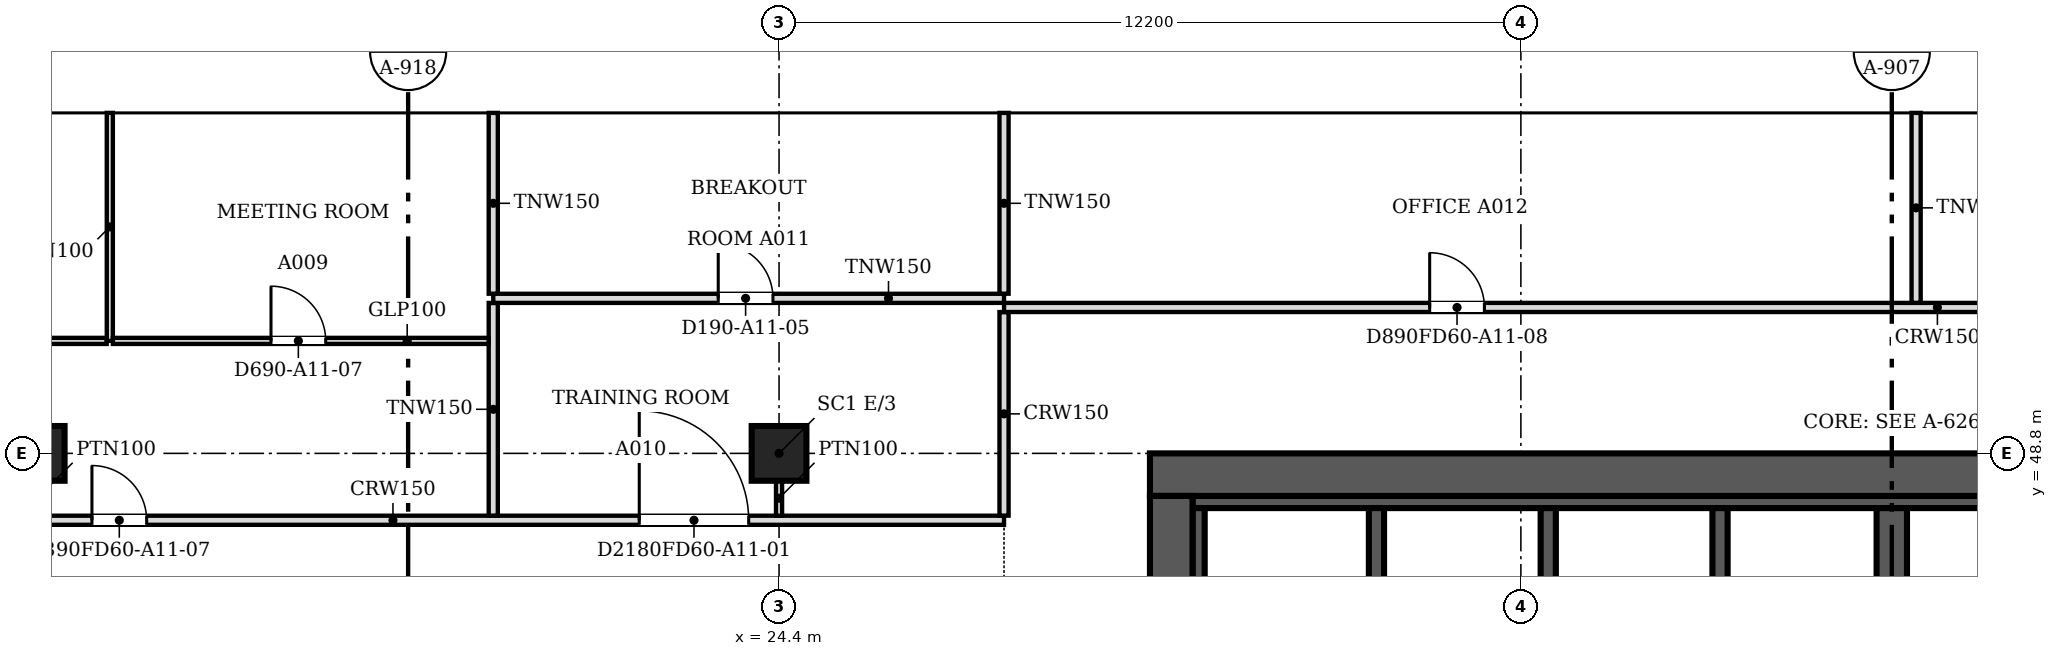
"""IFC4 building model, lengths in metres.
Left out: names, types, materials, properties, quantities, classifications, styles, units other than length and angle.
Written with IfcOpenShell. Run it as: python <this file> out.ifc"""

import sys

from ifc_helpers import new_model, si_unit, direction, frame, frame_2d, origin, origin_2d, place, context, subcontext, project, spatial, polyline, rectangle, outline, extrude, faceted_brep, source, transform, mapped, element, fill, save


model = new_model("IFC4")
c1 = context("Model", 3, precision=1e-05, world=origin(), true_north=direction((0.0, 1.0)))
c2 = subcontext(c1, "Body", "Model", "MODEL_VIEW")
j1 = project(units=[si_unit("LENGTHUNIT", "METRE"), si_unit("PLANEANGLEUNIT", "RADIAN")], contexts=[c1])
p1 = place(None, origin())
s1 = spatial("IfcSite", under=j1, at=p1, CompositionType="ELEMENT")
p2 = place(p1, origin())
s2 = spatial("IfcBuilding", under=s1, at=p2, CompositionType="ELEMENT")
p3 = place(p2, frame((0.0, 0.0, 124.0)))
s3 = spatial("IfcBuildingStorey", under=s2, at=p3, CompositionType="ELEMENT", Elevation=124.0)
for number, where, z_axis, x_axis in (
    (1, (12.2, 48.8, 0.0), (0.0, 0.0, 1.0), (1.0, 0.0, 0.0)),
    (2, (24.4, 48.8, 0.0), (0.0, 0.0, 1.0), (1.0, 0.0, 0.0)),
):
    element("IfcColumn", number, at=place(p3, frame(where, z_axis=z_axis, x_axis=x_axis)), inside=s3, PredefinedType="COLUMN", context=c2, shape_type="SweptSolid", body=[
        extrude(rectangle(XDim=0.9, YDim=0.9, at=origin_2d()), origin(), (0.0, 0.0, 1.0), 3.6),
    ])
m1 = source(origin(), c2, "Body", "SweptSolid", [
    extrude(outline(polyline([(3.05, 0.0), (6.1, 3.8), (3.05, 7.6), (0.0, 3.8), (3.05, 0.0)])), frame((0.0, 0.25, 0.0), z_axis=(0.0, -1.0, 0.0), x_axis=(1.0, 0.0, 0.0)), (0.0, 0.0, 1.0), 0.5),
])
p4 = place(p3, frame((48.8, 54.65, -3.8), z_axis=(0.0, 0.0, 1.0), x_axis=(-1.0, 0.0, 0.0)))
e3 = element("IfcWall", 3, at=p4, inside=s3, PredefinedType="SOLIDWALL", context=c2, shape_type="MappedRepresentation", body=[
    mapped(m1, transform((0.0, 0.0, 0.0), scale=1.0)),
])
m2 = source(origin(), c2, "Body", "SweptSolid", [
    extrude(outline(polyline([(3.05, 0.399), (5.78, 3.8), (3.05, 7.201), (0.321, 3.8), (3.05, 0.399)])), frame((0.0, 0.26, 0.0), z_axis=(0.0, -1.0, 0.0), x_axis=(1.0, 0.0, 0.0)), (0.0, 0.0, 1.0), 0.52),
])
p5 = place(p4, origin())
e4 = element("IfcOpeningElement", 4, at=p5, cuts=e3, PredefinedType="OPENING", context=c2, shape_type="MappedRepresentation", body=[
    mapped(m2, transform((0.0, 0.0, 0.0), scale=1.0)),
])
m3 = source(origin(), c2, "Body", "Brep", [
    faceted_brep([(3.05, -0.25, 0.0), (6.1, -0.25, 3.8), (6.1, -0.25, 3.8), (3.05, -0.25, 7.6), (0.0, -0.25, 3.8), (0.0, 0.25, 3.8), (3.05, 0.25, 7.6), (6.1, 0.25, 3.8), (6.1, 0.25, 3.8), (3.05, 0.25, 0.0)], [[[0, 1, 2, 3, 4]], [[5, 6, 7, 8, 9]], [[9, 8, 1, 0]], [[7, 6, 3, 2]], [[6, 5, 4, 3]], [[5, 9, 0, 4]], [[1, 8, 7, 2]]]),
])
p6 = place(p3, frame((42.7, 54.65, -3.8), z_axis=(0.0, 0.0, 1.0), x_axis=(-1.0, 0.0, 0.0)))
e5 = element("IfcWall", 5, at=p6, inside=s3, PredefinedType="SOLIDWALL", context=c2, shape_type="MappedRepresentation", body=[
    mapped(m3, transform((0.0, 0.0, 0.0), scale=1.0)),
])
p7 = place(p6, origin())
e6 = element("IfcOpeningElement", 6, at=p7, cuts=e5, PredefinedType="OPENING", context=c2, shape_type="MappedRepresentation", body=[
    mapped(m2, transform((0.0, 0.0, 0.0), scale=1.0)),
])
p8 = place(p3, frame((36.6, 54.65, -3.8), z_axis=(0.0, 0.0, 1.0), x_axis=(-1.0, 0.0, 0.0)))
e7 = element("IfcWall", 7, at=p8, inside=s3, PredefinedType="SOLIDWALL", context=c2, shape_type="MappedRepresentation", body=[
    mapped(m1, transform((0.0, 0.0, 0.0), scale=1.0)),
])
p9 = place(p8, origin())
e8 = element("IfcOpeningElement", 8, at=p9, cuts=e7, PredefinedType="OPENING", context=c2, shape_type="MappedRepresentation", body=[
    mapped(m2, transform((0.0, 0.0, 0.0), scale=1.0)),
])
p10 = place(p3, frame((30.5, 54.65, -3.8), z_axis=(0.0, 0.0, 1.0), x_axis=(-1.0, 0.0, 0.0)))
e9 = element("IfcWall", 9, at=p10, inside=s3, PredefinedType="SOLIDWALL", context=c2, shape_type="MappedRepresentation", body=[
    mapped(m1, transform((0.0, 0.0, 0.0), scale=1.0)),
])
p11 = place(p10, origin())
e10 = element("IfcOpeningElement", 10, at=p11, cuts=e9, PredefinedType="OPENING", context=c2, shape_type="MappedRepresentation", body=[
    mapped(m2, transform((0.0, 0.0, 0.0), scale=1.0)),
])
p12 = place(p3, frame((24.4, 54.65, -3.8), z_axis=(0.0, 0.0, 1.0), x_axis=(-1.0, 0.0, 0.0)))
e11 = element("IfcWall", 11, at=p12, inside=s3, PredefinedType="SOLIDWALL", context=c2, shape_type="MappedRepresentation", body=[
    mapped(m3, transform((0.0, 0.0, 0.0), scale=1.0)),
])
p13 = place(p12, origin())
e12 = element("IfcOpeningElement", 12, at=p13, cuts=e11, PredefinedType="OPENING", context=c2, shape_type="MappedRepresentation", body=[
    mapped(m2, transform((0.0, 0.0, 0.0), scale=1.0)),
])
p14 = place(p3, frame((18.3, 54.65, -3.8), z_axis=(0.0, 0.0, 1.0), x_axis=(-1.0, 0.0, 0.0)))
e13 = element("IfcWall", 13, at=p14, inside=s3, PredefinedType="SOLIDWALL", context=c2, shape_type="MappedRepresentation", body=[
    mapped(m1, transform((0.0, 0.0, 0.0), scale=1.0)),
])
p15 = place(p14, origin())
e14 = element("IfcOpeningElement", 14, at=p15, cuts=e13, PredefinedType="OPENING", context=c2, shape_type="MappedRepresentation", body=[
    mapped(m2, transform((0.0, 0.0, 0.0), scale=1.0)),
])
p16 = place(p2, frame((0.0, 0.0, 127.8)))
s4 = spatial("IfcBuildingStorey", under=s2, at=p16, CompositionType="ELEMENT", Elevation=127.8)
p17 = place(p16, frame((45.75, 54.65, -3.8), z_axis=(0.0, 0.0, 1.0), x_axis=(-1.0, 0.0, 0.0)))
e15 = element("IfcWall", 15, at=p17, inside=s4, PredefinedType="SOLIDWALL", context=c2, shape_type="MappedRepresentation", body=[
    mapped(m1, transform((0.0, 0.0, 0.0), scale=1.0)),
])
p18 = place(p17, origin())
e16 = element("IfcOpeningElement", 16, at=p18, cuts=e15, PredefinedType="OPENING", context=c2, shape_type="MappedRepresentation", body=[
    mapped(m2, transform((0.0, 0.0, 0.0), scale=1.0)),
])
p19 = place(p16, frame((39.65, 54.65, -3.8), z_axis=(0.0, 0.0, 1.0), x_axis=(-1.0, 0.0, 0.0)))
e17 = element("IfcWall", 17, at=p19, inside=s4, PredefinedType="SOLIDWALL", context=c2, shape_type="MappedRepresentation", body=[
    mapped(m3, transform((0.0, 0.0, 0.0), scale=1.0)),
])
p20 = place(p19, origin())
e18 = element("IfcOpeningElement", 18, at=p20, cuts=e17, PredefinedType="OPENING", context=c2, shape_type="MappedRepresentation", body=[
    mapped(m2, transform((0.0, 0.0, 0.0), scale=1.0)),
])
p21 = place(p16, frame((33.55, 54.65, -3.8), z_axis=(0.0, 0.0, 1.0), x_axis=(-1.0, 0.0, 0.0)))
e19 = element("IfcWall", 19, at=p21, inside=s4, PredefinedType="SOLIDWALL", context=c2, shape_type="MappedRepresentation", body=[
    mapped(m1, transform((0.0, 0.0, 0.0), scale=1.0)),
])
p22 = place(p21, origin())
e20 = element("IfcOpeningElement", 20, at=p22, cuts=e19, PredefinedType="OPENING", context=c2, shape_type="MappedRepresentation", body=[
    mapped(m2, transform((0.0, 0.0, 0.0), scale=1.0)),
])
p23 = place(p16, frame((27.45, 54.65, -3.8), z_axis=(0.0, 0.0, 1.0), x_axis=(-1.0, 0.0, 0.0)))
e21 = element("IfcWall", 21, at=p23, inside=s4, PredefinedType="SOLIDWALL", context=c2, shape_type="MappedRepresentation", body=[
    mapped(m3, transform((0.0, 0.0, 0.0), scale=1.0)),
])
p24 = place(p23, origin())
e22 = element("IfcOpeningElement", 22, at=p24, cuts=e21, PredefinedType="OPENING", context=c2, shape_type="MappedRepresentation", body=[
    mapped(m2, transform((0.0, 0.0, 0.0), scale=1.0)),
])
p25 = place(p16, frame((21.35, 54.65, -3.8), z_axis=(0.0, 0.0, 1.0), x_axis=(-1.0, 0.0, 0.0)))
e23 = element("IfcWall", 23, at=p25, inside=s4, PredefinedType="SOLIDWALL", context=c2, shape_type="MappedRepresentation", body=[
    mapped(m1, transform((0.0, 0.0, 0.0), scale=1.0)),
])
p26 = place(p25, origin())
e24 = element("IfcOpeningElement", 24, at=p26, cuts=e23, PredefinedType="OPENING", context=c2, shape_type="MappedRepresentation", body=[
    mapped(m2, transform((0.0, 0.0, 0.0), scale=1.0)),
])
p27 = place(p16, frame((15.25, 54.65, -3.8), z_axis=(0.0, 0.0, 1.0), x_axis=(-1.0, 0.0, 0.0)))
e25 = element("IfcWall", 25, at=p27, inside=s4, PredefinedType="SOLIDWALL", context=c2, shape_type="MappedRepresentation", body=[
    mapped(m1, transform((0.0, 0.0, 0.0), scale=1.0)),
])
p28 = place(p27, origin())
e26 = element("IfcOpeningElement", 26, at=p28, cuts=e25, PredefinedType="OPENING", context=c2, shape_type="MappedRepresentation", body=[
    mapped(m2, transform((0.0, 0.0, 0.0), scale=1.0)),
])
p29 = place(p3, frame((30.85, 25.1, 0.0), z_axis=(0.0, 0.0, 1.0), x_axis=(0.0, 1.0, 0.0)))
e27 = element("IfcWall", 27, at=p29, inside=s3, PredefinedType="SHEAR", context=c2, shape_type="SweptSolid", body=[
    extrude(rectangle(XDim=23.0, YDim=0.7, at=frame_2d((11.5, 0.0))), origin(), (0.0, 0.0, 1.0), 3.8),
])
m4 = source(origin(), c2, "Body", "SweptSolid", [
    extrude(rectangle(XDim=2.1, YDim=2.4, at=frame_2d((1.05, 1.2))), frame((0.0, 0.36, 0.0), z_axis=(0.0, -1.0, 0.0), x_axis=(1.0, 0.0, 0.0)), (0.0, 0.0, 1.0), 0.72),
])
p30 = place(p29, frame((4.7, 0.0, 0.0)))
e28 = element("IfcOpeningElement", 28, at=p30, cuts=e27, PredefinedType="OPENING", context=c2, shape_type="MappedRepresentation", body=[
    mapped(m4, transform((0.0, 0.0, 0.0), scale=1.0)),
])
p31 = place(p29, frame((16.2, 0.0, 0.0)))
e29 = element("IfcOpeningElement", 29, at=p31, cuts=e27, PredefinedType="OPENING", context=c2, shape_type="MappedRepresentation", body=[
    mapped(m4, transform((0.0, 0.0, 0.0), scale=1.0)),
])
p32 = place(p3, frame((30.5, 48.45, 0.0), z_axis=(0.0, 0.0, 1.0), x_axis=(1.0, 0.0, 0.0)))
e30 = element("IfcWall", 30, at=p32, inside=s3, PredefinedType="SHEAR", context=c2, shape_type="SweptSolid", body=[
    extrude(rectangle(XDim=24.4, YDim=0.7, at=frame_2d((12.2, 0.0))), origin(), (0.0, 0.0, 1.0), 3.8),
])
p33 = place(p3, frame((31.2, 48.0, 0.0), z_axis=(0.0, 0.0, 1.0), x_axis=(1.0, 0.0, 0.0)))
e31 = element("IfcWall", 31, at=p33, inside=s3, PredefinedType="SOLIDWALL", context=c2, shape_type="SweptSolid", body=[
    extrude(rectangle(XDim=23.0, YDim=0.2, at=frame_2d((11.5, 0.0))), origin(), (0.0, 0.0, 1.0), 3.8),
])
p34 = place(p3, frame((31.3, 43.4, 0.0), z_axis=(0.0, 0.0, 1.0), x_axis=(0.0, 1.0, 0.0)))
e32 = element("IfcWall", 32, at=p34, inside=s3, PredefinedType="SOLIDWALL", context=c2, shape_type="SweptSolid", body=[
    extrude(rectangle(XDim=4.5, YDim=0.2, at=frame_2d((2.25, 0.0))), origin(), (0.0, 0.0, 1.0), 3.8),
])
p35 = place(p3, frame((42.7, 44.9, 0.0), z_axis=(0.0, 0.0, 1.0), x_axis=(0.0, 1.0, 0.0)))
e33 = element("IfcWall", 33, at=p35, inside=s3, PredefinedType="SHEAR", context=c2, shape_type="SweptSolid", body=[
    extrude(rectangle(XDim=3.0, YDim=0.5, at=frame_2d((1.5, 0.0))), origin(), (0.0, 0.0, 1.0), 3.8),
])
for number, where, z_axis, x_axis in (
    (34, (34.225, 45.025, 0.0), (0.0, 0.0, 1.0), (0.0, 1.0, 0.0)),
    (35, (37.05, 45.025, 0.0), (0.0, 0.0, 1.0), (0.0, 1.0, 0.0)),
    (36, (39.875, 45.025, 0.0), (0.0, 0.0, 1.0), (0.0, 1.0, 0.0)),
):
    element("IfcWall", number, at=place(p3, frame(where, z_axis=z_axis, x_axis=x_axis)), inside=s3, PredefinedType="SOLIDWALL", context=c2, shape_type="SweptSolid", body=[
        extrude(rectangle(XDim=2.875, YDim=0.25, at=frame_2d((1.438, 0.0))), origin(), (0.0, 0.0, 1.0), 3.8),
    ])
p36 = place(p3, frame((7.5, 47.7, 0.0), z_axis=(0.0, 0.0, 1.0), x_axis=(1.0, 0.0, 0.0)))
e37 = element("IfcWall", 37, at=p36, inside=s3, PredefinedType="PARTITIONING", context=c2, shape_type="SweptSolid", body=[
    extrude(rectangle(XDim=20.6, YDim=0.15, at=frame_2d((10.3, 0.0))), origin(), (0.0, 0.0, 1.0), 3.067),
])
m5 = source(origin(), c2, "Body", "SweptSolid", [
    extrude(rectangle(XDim=1.8, YDim=2.1, at=frame_2d((0.9, 1.05))), frame((0.0, 0.085, 0.0), z_axis=(0.0, -1.0, 0.0), x_axis=(1.0, 0.0, 0.0)), (0.0, 0.0, 1.0), 0.17),
])
p37 = place(p36, frame((14.601, 0.0, 0.0)))
e38 = element("IfcOpeningElement", 38, at=p37, cuts=e37, PredefinedType="OPENING", context=c2, shape_type="MappedRepresentation", body=[
    mapped(m5, transform((0.0, 0.0, 0.0), scale=1.0)),
])
m6 = source(origin(), c2, "Body", "SweptSolid", [
    extrude(rectangle(XDim=0.9, YDim=2.1, at=frame_2d((0.45, 1.05))), frame((0.0, 0.085, 0.0), z_axis=(0.0, -1.0, 0.0), x_axis=(1.0, 0.0, 0.0)), (0.0, 0.0, 1.0), 0.17),
])
p38 = place(p36, frame((5.6, 0.0, 0.0)))
e39 = element("IfcOpeningElement", 39, at=p38, cuts=e37, PredefinedType="OPENING", context=c2, shape_type="MappedRepresentation", body=[
    mapped(m6, transform((0.0, 0.0, 0.0), scale=1.0)),
])
p39 = place(p3, frame((19.7, 47.776, 0.0), z_axis=(0.0, 0.0, 1.0), x_axis=(0.0, 1.0, 0.0)))
e40 = element("IfcWall", 40, at=p39, inside=s3, PredefinedType="PARTITIONING", context=c2, shape_type="SweptSolid", body=[
    extrude(rectangle(XDim=3.498, YDim=0.15, at=frame_2d((1.749, 0.0))), origin(), (0.0, 0.0, 1.0), 3.067),
])
p40 = place(p3, frame((28.1, 47.776, 0.0), z_axis=(0.0, 0.0, 1.0), x_axis=(0.0, 1.0, 0.0)))
e41 = element("IfcWall", 41, at=p40, inside=s3, PredefinedType="PARTITIONING", context=c2, shape_type="SweptSolid", body=[
    extrude(rectangle(XDim=3.348, YDim=0.15, at=frame_2d((1.674, 0.0))), origin(), (0.0, 0.0, 1.0), 3.067),
])
p41 = place(p3, frame((24.4, 48.35, 0.0), z_axis=(0.0, 0.0, 1.0), x_axis=(0.0, -1.0, 0.0)))
e42 = element("IfcWall", 42, at=p41, inside=s3, PredefinedType="PARTITIONING", context=c2, shape_type="SweptSolid", body=[
    extrude(rectangle(XDim=0.575, YDim=0.1, at=frame_2d((0.288, 0.0))), origin(), (0.0, 0.0, 1.0), 3.067),
])
p42 = place(p3, frame((7.5, 50.65, 0.0), z_axis=(0.0, 0.0, 1.0), x_axis=(1.0, 0.0, 0.0)))
e43 = element("IfcWall", 43, at=p42, inside=s3, PredefinedType="PARTITIONING", context=c2, shape_type="SweptSolid", body=[
    extrude(rectangle(XDim=5.843, YDim=0.1, at=frame_2d((2.921, 0.0))), origin(), (0.0, 0.0, 1.0), 3.067),
])
m7 = source(origin(), c2, "Body", "SweptSolid", [
    extrude(rectangle(XDim=0.9, YDim=2.1, at=frame_2d((0.45, 1.05))), frame((0.0, 0.06, 0.0), z_axis=(0.0, -1.0, 0.0), x_axis=(1.0, 0.0, 0.0)), (0.0, 0.0, 1.0), 0.12),
])
p43 = place(p42, frame((2.5, 0.0, 0.0)))
e44 = element("IfcOpeningElement", 44, at=p43, cuts=e43, PredefinedType="OPENING", context=c2, shape_type="MappedRepresentation", body=[
    mapped(m7, transform((0.0, 0.0, 0.0), scale=1.0)),
])
p44 = place(p3, frame((13.394, 50.65, 0.0), z_axis=(0.0, 0.0, 1.0), x_axis=(0.0, 1.0, 0.0)))
e45 = element("IfcWall", 45, at=p44, inside=s3, PredefinedType="PARTITIONING", context=c2, shape_type="SweptSolid", body=[
    extrude(rectangle(XDim=3.75, YDim=0.1, at=frame_2d((1.875, 0.0))), origin(), (0.0, 0.0, 1.0), 3.067),
])
p45 = place(p3, frame((13.445, 50.65, 0.0), z_axis=(0.0, 0.0, 1.0), x_axis=(1.0, 0.0, 0.0)))
e46 = element("IfcWall", 46, at=p45, inside=s3, PredefinedType="PARTITIONING", context=c2, shape_type="SweptSolid", body=[
    extrude(rectangle(XDim=6.179, YDim=0.1, at=frame_2d((3.09, 0.0))), origin(), (0.0, 0.0, 1.0), 3.067),
])
p46 = place(p45, frame((2.6, 0.0, 0.0)))
e47 = element("IfcOpeningElement", 47, at=p46, cuts=e46, PredefinedType="OPENING", context=c2, shape_type="MappedRepresentation", body=[
    mapped(m7, transform((0.0, 0.0, 0.0), scale=1.0)),
])
p47 = place(p3, frame((28.1, 51.2, 0.0), z_axis=(0.0, 0.0, 1.0), x_axis=(1.0, 0.0, 0.0)))
e48 = element("IfcWall", 48, at=p47, inside=s3, PredefinedType="PARTITIONING", context=c2, shape_type="SweptSolid", body=[
    extrude(rectangle(XDim=31.438, YDim=0.15, at=frame_2d((15.719, 0.0))), origin(), (0.0, 0.0, 1.0), 3.067),
])
p48 = place(p47, frame((7.0, 0.0, 0.0)))
e49 = element("IfcOpeningElement", 49, at=p48, cuts=e48, PredefinedType="OPENING", context=c2, shape_type="MappedRepresentation", body=[
    mapped(m6, transform((0.0, 0.0, 0.0), scale=1.0)),
])
p49 = place(p47, frame((22.8, 0.0, 0.0)))
e50 = element("IfcOpeningElement", 50, at=p49, cuts=e48, PredefinedType="OPENING", context=c2, shape_type="MappedRepresentation", body=[
    mapped(m6, transform((0.0, 0.0, 0.0), scale=1.0)),
])
p50 = place(p3, frame((43.1, 51.276, 0.0), z_axis=(0.0, 0.0, 1.0), x_axis=(0.0, 1.0, 0.0)))
e51 = element("IfcWall", 51, at=p50, inside=s3, PredefinedType="PARTITIONING", context=c2, shape_type="SweptSolid", body=[
    extrude(rectangle(XDim=3.124, YDim=0.15, at=frame_2d((1.562, 0.0))), origin(), (0.0, 0.0, 1.0), 3.067),
])
p51 = place(p3, frame((19.7, 51.35, 0.0), z_axis=(0.0, 0.0, 1.0), x_axis=(1.0, 0.0, 0.0)))
e52 = element("IfcWall", 52, at=p51, inside=s3, PredefinedType="PARTITIONING", context=c2, shape_type="SweptSolid", body=[
    extrude(rectangle(XDim=8.4, YDim=0.15, at=frame_2d((4.2, 0.0))), origin(), (0.0, 0.0, 1.0), 3.067),
])
p52 = place(p51, frame((3.7, 0.0, 0.0)))
e53 = element("IfcOpeningElement", 53, at=p52, cuts=e52, PredefinedType="OPENING", context=c2, shape_type="MappedRepresentation", body=[
    mapped(m6, transform((0.0, 0.0, 0.0), scale=1.0)),
])
for number, where, z_axis, x_axis in (
    (54, (19.7, 51.426, 0.0), (0.0, 0.0, 1.0), (0.0, 1.0, 0.0)),
    (55, (28.1, 51.426, 0.0), (0.0, 0.0, 1.0), (0.0, 1.0, 0.0)),
):
    element("IfcWall", number, at=place(p3, frame(where, z_axis=z_axis, x_axis=x_axis)), inside=s3, PredefinedType="PARTITIONING", context=c2, shape_type="SweptSolid", body=[
        extrude(rectangle(XDim=2.974, YDim=0.15, at=frame_2d((1.487, 0.0))), origin(), (0.0, 0.0, 1.0), 3.067),
    ])
m8 = source(origin(), c2, "Body", "SweptSolid", [
    extrude(rectangle(XDim=0.9, YDim=2.1, at=frame_2d((0.45, 1.05))), frame((0.0, 0.025, 0.0), z_axis=(0.0, -1.0, 0.0), x_axis=(1.0, 0.0, 0.0)), (0.0, 0.0, 1.0), 0.05),
])
p53 = place(p46, origin())
e56 = element("IfcDoor", 56, at=p53, inside=s3, OperationType="SINGLE_SWING_LEFT", PredefinedType="DOOR", context=c2, shape_type="MappedRepresentation", body=[
    mapped(m8, transform((0.0, 0.0, 0.0), scale=1.0)),
])
fill(e47, e56)
m9 = source(origin(), c2, "Body", "SweptSolid", [
    extrude(rectangle(XDim=1.8, YDim=2.1, at=frame_2d((0.9, 1.05))), frame((0.0, 0.025, 0.0), z_axis=(0.0, -1.0, 0.0), x_axis=(1.0, 0.0, 0.0)), (0.0, 0.0, 1.0), 0.05),
])
p54 = place(p37, origin())
e57 = element("IfcDoor", 57, at=p54, inside=s3, OperationType="DOUBLE_DOOR_SINGLE_SWING", PredefinedType="DOOR", context=c2, shape_type="MappedRepresentation", body=[
    mapped(m9, transform((0.0, 0.0, 0.0), scale=1.0)),
])
fill(e38, e57)
p55 = place(p52, origin())
e58 = element("IfcDoor", 58, at=p55, inside=s3, OperationType="SINGLE_SWING_LEFT", PredefinedType="DOOR", context=c2, shape_type="MappedRepresentation", body=[
    mapped(m8, transform((0.0, 0.0, 0.0), scale=1.0)),
])
fill(e53, e58)
p56 = place(p38, origin())
e59 = element("IfcDoor", 59, at=p56, inside=s3, OperationType="SINGLE_SWING_LEFT", PredefinedType="DOOR", context=c2, shape_type="MappedRepresentation", body=[
    mapped(m8, transform((0.0, 0.0, 0.0), scale=1.0)),
])
fill(e39, e59)
p57 = place(p48, origin())
e60 = element("IfcDoor", 60, at=p57, inside=s3, OperationType="SINGLE_SWING_LEFT", PredefinedType="DOOR", context=c2, shape_type="MappedRepresentation", body=[
    mapped(m8, transform((0.0, 0.0, 0.0), scale=1.0)),
])
fill(e49, e60)
save(model, sys.argv[1])
